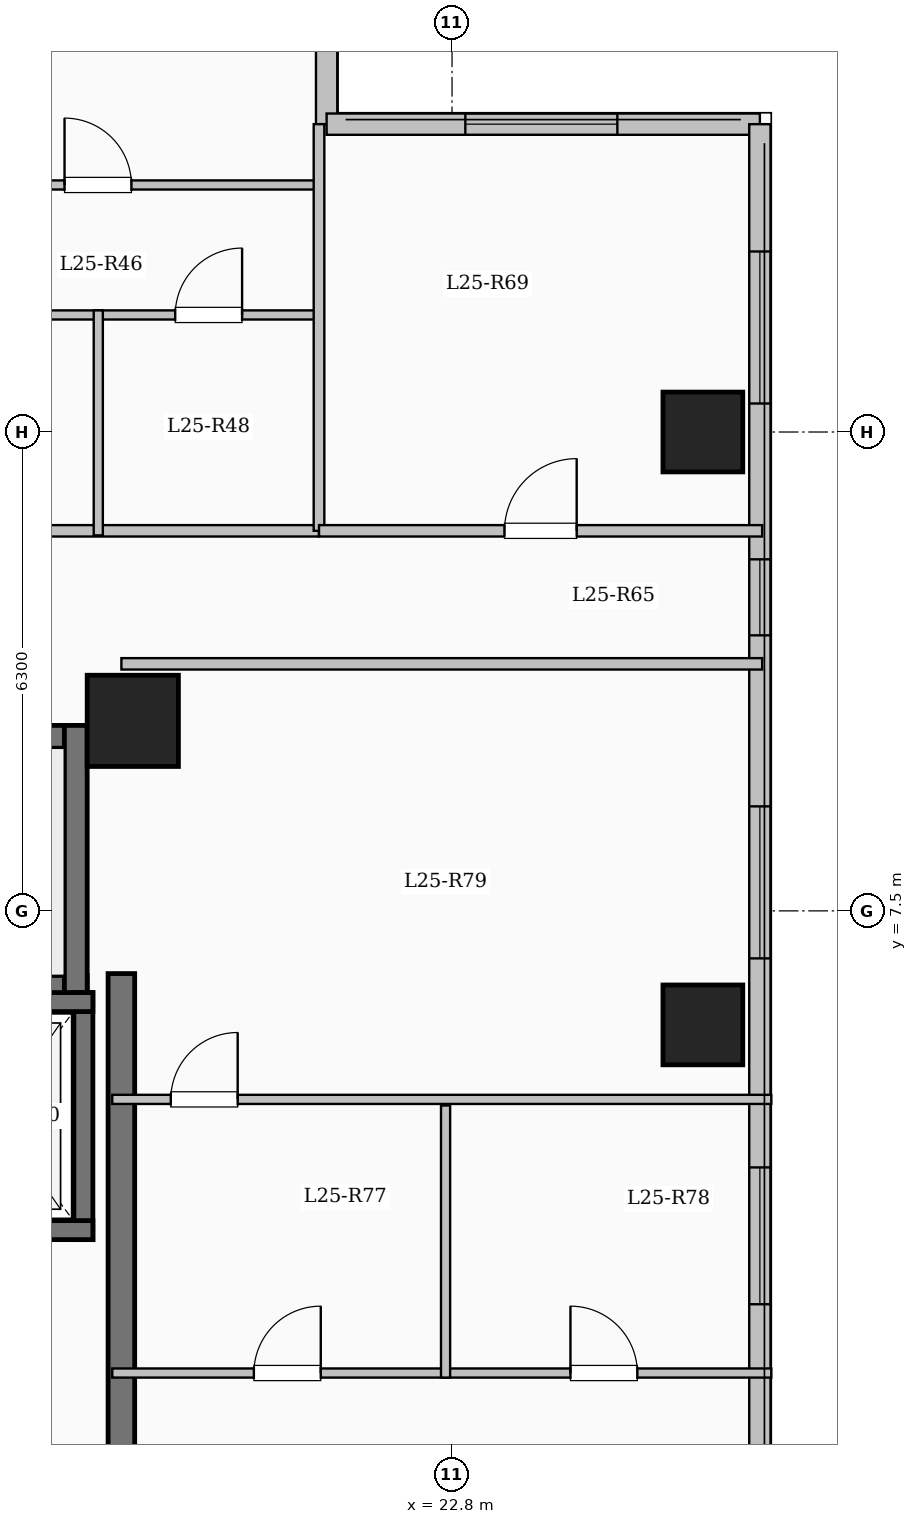
"""IFC4 building model, lengths in metres.
Left out: names, types, materials, properties, quantities, classifications, styles, units other than length and angle.
Written with IfcOpenShell. Run it as: python <this file> out.ifc"""

import sys

from ifc_helpers import new_model, si_unit, direction, frame, frame_2d, origin, origin_2d, place, context, subcontext, project, spatial, rectangle, extrude, element, fill, save


model = new_model("IFC4")
c1 = context("Model", 3, precision=1e-05, world=origin(), true_north=direction((0.0, 1.0)))
c2 = subcontext(c1, "Body", "Model", "MODEL_VIEW")
j1 = project(units=[si_unit("LENGTHUNIT", "METRE"), si_unit("PLANEANGLEUNIT", "RADIAN")], contexts=[c1])
p1 = place(None, origin())
s1 = spatial("IfcSite", under=j1, at=p1, CompositionType="ELEMENT")
p2 = place(p1, origin())
s2 = spatial("IfcBuilding", under=s1, at=p2, CompositionType="ELEMENT")
p3 = place(p2, frame((0.0, 0.0, 95.05)))
s3 = spatial("IfcBuildingStorey", under=s2, at=p3, CompositionType="ELEMENT", Elevation=95.05)
p4 = place(p3, frame((18.6, 10.0, 0.0), z_axis=(0.0, 0.0, 1.0), x_axis=(1.0, 0.0, 0.0)))
e1 = element("IfcColumn", 1, at=p4, inside=s3, PredefinedType="COLUMN", context=c2, shape_type="SweptSolid", body=[
    extrude(rectangle(XDim=1.2, YDim=1.2, at=origin_2d()), origin(), (0.0, 0.0, 1.0), 3.35),
])
for number, where, z_axis, x_axis in (
    (2, (26.1, 6.0, 0.0), (0.0, 0.0, 1.0), (1.0, 0.0, 0.0)),
    (3, (26.1, 13.8, 0.0), (0.0, 0.0, 1.0), (1.0, 0.0, 0.0)),
):
    element("IfcColumn", number, at=place(p3, frame(where, z_axis=z_axis, x_axis=x_axis)), inside=s3, PredefinedType="COLUMN", context=c2, shape_type="SweptSolid", body=[
        extrude(rectangle(XDim=1.05, YDim=1.05, at=origin_2d()), origin(), (0.0, 0.0, 1.0), 3.35),
    ])
p5 = place(p3, frame((21.15, 22.05, 0.0), z_axis=(0.0, 0.0, 1.0), x_axis=(0.0, -1.0, 0.0)))
e4 = element("IfcWall", 4, at=p5, inside=s3, PredefinedType="SOLIDWALL", context=c2, shape_type="SweptSolid", body=[
    extrude(rectangle(XDim=4.2, YDim=0.28, at=frame_2d((2.1, 0.0))), origin(), (0.0, 0.0, 1.0), 3.1),
])
p6 = place(p5, frame((1.218, 0.0, 0.9)))
e5 = element("IfcOpeningElement", 5, at=p6, cuts=e4, PredefinedType="OPENING", context=c2, shape_type="SweptSolid", body=[
    extrude(rectangle(XDim=1.8, YDim=1.65, at=frame_2d((0.9, 0.825))), frame((0.0, 0.15, 0.0), z_axis=(0.0, -1.0, 0.0), x_axis=(1.0, 0.0, 0.0)), (0.0, 0.0, 1.0), 0.3),
])
p7 = place(p3, frame((21.15, 17.85, 0.0), z_axis=(0.0, 0.0, 1.0), x_axis=(1.0, 0.0, 0.0)))
e6 = element("IfcWall", 6, at=p7, inside=s3, PredefinedType="SOLIDWALL", context=c2, shape_type="SweptSolid", body=[
    extrude(rectangle(XDim=5.7, YDim=0.28, at=frame_2d((2.85, 0.0))), origin(), (0.0, 0.0, 1.0), 3.1),
])
p8 = place(p7, frame((1.825, 0.0, 0.9)))
e7 = element("IfcOpeningElement", 7, at=p8, cuts=e6, PredefinedType="OPENING", context=c2, shape_type="SweptSolid", body=[
    extrude(rectangle(XDim=2.0, YDim=1.7, at=frame_2d((1.0, 0.85))), frame((0.0, 0.15, 0.0), z_axis=(0.0, -1.0, 0.0), x_axis=(1.0, 0.0, 0.0)), (0.0, 0.0, 1.0), 0.3),
])
p9 = place(p3, frame((26.85, 17.85, 0.0), z_axis=(0.0, 0.0, 1.0), x_axis=(0.0, -1.0, 0.0)))
e8 = element("IfcWall", 8, at=p9, inside=s3, PredefinedType="SOLIDWALL", context=c2, shape_type="SweptSolid", body=[
    extrude(rectangle(XDim=35.7, YDim=0.28, at=frame_2d((17.85, 0.0))), origin(), (0.0, 0.0, 1.0), 3.1),
])
p10 = place(p9, frame((1.675, 0.0, 0.9)))
e9 = element("IfcOpeningElement", 9, at=p10, cuts=e8, PredefinedType="OPENING", context=c2, shape_type="SweptSolid", body=[
    extrude(rectangle(XDim=2.0, YDim=1.7, at=frame_2d((1.0, 0.85))), frame((0.0, 0.15, 0.0), z_axis=(0.0, -1.0, 0.0), x_axis=(1.0, 0.0, 0.0)), (0.0, 0.0, 1.0), 0.3),
])
p11 = place(p9, frame((5.725, 0.0, 0.95)))
e10 = element("IfcOpeningElement", 10, at=p11, cuts=e8, PredefinedType="OPENING", context=c2, shape_type="SweptSolid", body=[
    extrude(rectangle(XDim=1.0, YDim=1.5, at=frame_2d((0.5, 0.75))), frame((0.0, 0.15, 0.0), z_axis=(0.0, -1.0, 0.0), x_axis=(1.0, 0.0, 0.0)), (0.0, 0.0, 1.0), 0.3),
])
p12 = place(p9, frame((8.975, 0.0, 0.9)))
e11 = element("IfcOpeningElement", 11, at=p12, cuts=e8, PredefinedType="OPENING", context=c2, shape_type="SweptSolid", body=[
    extrude(rectangle(XDim=2.0, YDim=1.7, at=frame_2d((1.0, 0.85))), frame((0.0, 0.15, 0.0), z_axis=(0.0, -1.0, 0.0), x_axis=(1.0, 0.0, 0.0)), (0.0, 0.0, 1.0), 0.3),
])
p13 = place(p9, frame((13.725, 0.0, 0.9)))
e12 = element("IfcOpeningElement", 12, at=p13, cuts=e8, PredefinedType="OPENING", context=c2, shape_type="SweptSolid", body=[
    extrude(rectangle(XDim=1.8, YDim=1.65, at=frame_2d((0.9, 0.825))), frame((0.0, 0.15, 0.0), z_axis=(0.0, -1.0, 0.0), x_axis=(1.0, 0.0, 0.0)), (0.0, 0.0, 1.0), 0.3),
])
p14 = place(p9, frame((19.55, 0.0, 0.9)))
e13 = element("IfcOpeningElement", 13, at=p14, cuts=e8, PredefinedType="OPENING", context=c2, shape_type="SweptSolid", body=[
    extrude(rectangle(XDim=2.4, YDim=1.8, at=frame_2d((1.2, 0.9))), frame((0.0, 0.15, 0.0), z_axis=(0.0, -1.0, 0.0), x_axis=(1.0, 0.0, 0.0)), (0.0, 0.0, 1.0), 0.3),
])
p15 = place(p9, frame((25.857, 0.0, 0.9)))
e14 = element("IfcOpeningElement", 14, at=p15, cuts=e8, PredefinedType="OPENING", context=c2, shape_type="SweptSolid", body=[
    extrude(rectangle(XDim=1.5, YDim=1.65, at=frame_2d((0.75, 0.825))), frame((0.0, 0.15, 0.0), z_axis=(0.0, -1.0, 0.0), x_axis=(1.0, 0.0, 0.0)), (0.0, 0.0, 1.0), 0.3),
])
p16 = place(p9, frame((30.75, 0.0, 0.9)))
e15 = element("IfcOpeningElement", 15, at=p16, cuts=e8, PredefinedType="OPENING", context=c2, shape_type="SweptSolid", body=[
    extrude(rectangle(XDim=2.4, YDim=1.8, at=frame_2d((1.2, 0.9))), frame((0.0, 0.15, 0.0), z_axis=(0.0, -1.0, 0.0), x_axis=(1.0, 0.0, 0.0)), (0.0, 0.0, 1.0), 0.3),
])
p17 = place(p3, frame((10.0, 9.79, 0.0), z_axis=(0.0, 0.0, 1.0), x_axis=(1.0, 0.0, 0.0)))
e16 = element("IfcWall", 16, at=p17, inside=s3, PredefinedType="SHEAR", context=c2, shape_type="SweptSolid", body=[
    extrude(rectangle(XDim=8.0, YDim=0.3, at=frame_2d((4.0, 0.0))), origin(), (0.0, 0.0, 1.0), 3.35),
])
p18 = place(p3, frame((10.0, 6.5, 0.0), z_axis=(0.0, 0.0, 1.0), x_axis=(1.0, 0.0, 0.0)))
e17 = element("IfcWall", 17, at=p18, inside=s3, PredefinedType="SHEAR", context=c2, shape_type="SweptSolid", body=[
    extrude(rectangle(XDim=8.0, YDim=0.3, at=frame_2d((4.0, 0.0))), origin(), (0.0, 0.0, 1.0), 3.35),
])
p19 = place(p18, frame((0.55, 0.0, 0.0)))
e18 = element("IfcOpeningElement", 18, at=p19, cuts=e17, PredefinedType="OPENING", context=c2, shape_type="SweptSolid", body=[
    extrude(rectangle(XDim=1.0, YDim=2.15, at=frame_2d((0.5, 1.075))), frame((0.0, 0.16, 0.0), z_axis=(0.0, -1.0, 0.0), x_axis=(1.0, 0.0, 0.0)), (0.0, 0.0, 1.0), 0.32),
])
p20 = place(p3, frame((17.85, 6.35, 0.0), z_axis=(0.0, 0.0, 1.0), x_axis=(0.0, 1.0, 0.0)))
e19 = element("IfcWall", 19, at=p20, inside=s3, PredefinedType="SHEAR", context=c2, shape_type="SweptSolid", body=[
    extrude(rectangle(XDim=3.59, YDim=0.3, at=frame_2d((1.795, 0.0))), origin(), (0.0, 0.0, 1.0), 3.35),
])
p21 = place(p3, frame((17.95, 3.175, 0.0), z_axis=(0.0, 0.0, 1.0), x_axis=(0.0, 1.0, 0.0)))
e20 = element("IfcWall", 20, at=p21, inside=s3, PredefinedType="SHEAR", context=c2, shape_type="SweptSolid", body=[
    extrude(rectangle(XDim=3.25, YDim=0.25, at=frame_2d((1.625, 0.0))), origin(), (0.0, 0.0, 1.0), 3.35),
])
for number, where, z_axis, x_axis in (
    (21, (15.525, 3.3, 0.0), (0.0, 0.0, 1.0), (1.0, 0.0, 0.0)),
    (22, (15.525, 6.3, 0.0), (0.0, 0.0, 1.0), (1.0, 0.0, 0.0)),
):
    element("IfcWall", number, at=place(p3, frame(where, z_axis=z_axis, x_axis=x_axis)), inside=s3, PredefinedType="SHEAR", context=c2, shape_type="SweptSolid", body=[
        extrude(rectangle(XDim=2.55, YDim=0.25, at=frame_2d((1.275, 0.0))), origin(), (0.0, 0.0, 1.0), 3.35),
    ])
p22 = place(p3, frame((18.45, -7.375, 0.0), z_axis=(0.0, 0.0, 1.0), x_axis=(0.0, 1.0, 0.0)))
e23 = element("IfcWall", 23, at=p22, inside=s3, PredefinedType="SHEAR", context=c2, shape_type="SweptSolid", body=[
    extrude(rectangle(XDim=14.05, YDim=0.35, at=frame_2d((7.025, 0.0))), origin(), (0.0, 0.0, 1.0), 3.35),
])
p23 = place(p3, frame((3.85, 12.5, 0.0), z_axis=(0.0, 0.0, 1.0), x_axis=(1.0, 0.0, 0.0)))
e24 = element("IfcWall", 24, at=p23, inside=s3, PredefinedType="PARTITIONING", context=c2, shape_type="SweptSolid", body=[
    extrude(rectangle(XDim=17.2, YDim=0.15, at=frame_2d((8.6, 0.0))), origin(), (0.0, 0.0, 1.0), 3.1),
])
p24 = place(p23, frame((1.6, 0.0, 0.0)))
e25 = element("IfcOpeningElement", 25, at=p24, cuts=e24, PredefinedType="OPENING", context=c2, shape_type="SweptSolid", body=[
    extrude(rectangle(XDim=0.96, YDim=2.15, at=frame_2d((0.48, 1.075))), frame((0.0, 0.085, 0.0), z_axis=(0.0, -1.0, 0.0), x_axis=(1.0, 0.0, 0.0)), (0.0, 0.0, 1.0), 0.17),
])
p25 = place(p23, frame((6.625, 0.0, 0.0)))
e26 = element("IfcOpeningElement", 26, at=p25, cuts=e24, PredefinedType="OPENING", context=c2, shape_type="SweptSolid", body=[
    extrude(rectangle(XDim=0.96, YDim=2.15, at=frame_2d((0.48, 1.075))), frame((0.0, 0.085, 0.0), z_axis=(0.0, -1.0, 0.0), x_axis=(1.0, 0.0, 0.0)), (0.0, 0.0, 1.0), 0.17),
])
p26 = place(p3, frame((15.413, 15.34, 0.0), z_axis=(0.0, 0.0, 1.0), x_axis=(1.0, 0.0, 0.0)))
e27 = element("IfcWall", 27, at=p26, inside=s3, PredefinedType="PARTITIONING", context=c2, shape_type="SweptSolid", body=[
    extrude(rectangle(XDim=2.733, YDim=0.12, at=frame_2d((1.366, 0.0))), origin(), (0.0, 0.0, 1.0), 3.1),
])
p27 = place(p26, frame((0.927, 0.0, 0.0)))
e28 = element("IfcOpeningElement", 28, at=p27, cuts=e27, PredefinedType="OPENING", context=c2, shape_type="SweptSolid", body=[
    extrude(rectangle(XDim=0.88, YDim=2.1, at=frame_2d((0.44, 1.05))), frame((0.0, 0.07, 0.0), z_axis=(0.0, -1.0, 0.0), x_axis=(1.0, 0.0, 0.0)), (0.0, 0.0, 1.0), 0.14),
])
p28 = place(p3, frame((18.146, 15.34, 0.0), z_axis=(0.0, 0.0, 1.0), x_axis=(1.0, 0.0, 0.0)))
e29 = element("IfcWall", 29, at=p28, inside=s3, PredefinedType="PARTITIONING", context=c2, shape_type="SweptSolid", body=[
    extrude(rectangle(XDim=2.904, YDim=0.12, at=frame_2d((1.452, 0.0))), origin(), (0.0, 0.0, 1.0), 3.1),
])
p29 = place(p28, frame((1.012, 0.0, 0.0)))
e30 = element("IfcOpeningElement", 30, at=p29, cuts=e29, PredefinedType="OPENING", context=c2, shape_type="SweptSolid", body=[
    extrude(rectangle(XDim=0.88, YDim=2.1, at=frame_2d((0.44, 1.05))), frame((0.0, 0.07, 0.0), z_axis=(0.0, -1.0, 0.0), x_axis=(1.0, 0.0, 0.0)), (0.0, 0.0, 1.0), 0.14),
])
p30 = place(p3, frame((15.353, 17.05, 0.0), z_axis=(0.0, 0.0, 1.0), x_axis=(1.0, 0.0, 0.0)))
e31 = element("IfcWall", 31, at=p30, inside=s3, PredefinedType="PARTITIONING", context=c2, shape_type="SweptSolid", body=[
    extrude(rectangle(XDim=5.757, YDim=0.12, at=frame_2d((2.878, 0.0))), origin(), (0.0, 0.0, 1.0), 3.1),
])
p31 = place(p30, frame((2.349, 0.0, 0.0)))
e32 = element("IfcOpeningElement", 32, at=p31, cuts=e31, PredefinedType="OPENING", context=c2, shape_type="SweptSolid", body=[
    extrude(rectangle(XDim=0.88, YDim=2.1, at=frame_2d((0.44, 1.05))), frame((0.0, 0.07, 0.0), z_axis=(0.0, -1.0, 0.0), x_axis=(1.0, 0.0, 0.0)), (0.0, 0.0, 1.0), 0.14),
])
p32 = place(p3, frame((18.146, 12.44, 0.0), z_axis=(0.0, 0.0, 1.0), x_axis=(0.0, 1.0, 0.0)))
e33 = element("IfcWall", 33, at=p32, inside=s3, PredefinedType="PARTITIONING", context=c2, shape_type="SweptSolid", body=[
    extrude(rectangle(XDim=2.96, YDim=0.12, at=frame_2d((1.48, 0.0))), origin(), (0.0, 0.0, 1.0), 3.1),
])
p33 = place(p3, frame((18.45, 10.75, 0.0), z_axis=(0.0, 0.0, 1.0), x_axis=(1.0, 0.0, 0.0)))
e34 = element("IfcWall", 34, at=p33, inside=s3, PredefinedType="PARTITIONING", context=c2, shape_type="SweptSolid", body=[
    extrude(rectangle(XDim=8.43, YDim=0.15, at=frame_2d((4.215, 0.0))), origin(), (0.0, 0.0, 1.0), 3.1),
])
p34 = place(p3, frame((21.05, 12.5, 0.0), z_axis=(0.0, 0.0, 1.0), x_axis=(0.0, 1.0, 0.0)))
e35 = element("IfcWall", 35, at=p34, inside=s3, PredefinedType="PARTITIONING", context=c2, shape_type="SweptSolid", body=[
    extrude(rectangle(XDim=5.35, YDim=0.14, at=frame_2d((2.675, 0.0))), origin(), (0.0, 0.0, 1.0), 3.1),
])
p35 = place(p3, frame((21.05, 12.5, 0.0), z_axis=(0.0, 0.0, 1.0), x_axis=(1.0, 0.0, 0.0)))
e36 = element("IfcWall", 36, at=p35, inside=s3, PredefinedType="PARTITIONING", context=c2, shape_type="SweptSolid", body=[
    extrude(rectangle(XDim=5.83, YDim=0.15, at=frame_2d((2.915, 0.0))), origin(), (0.0, 0.0, 1.0), 3.1),
])
p36 = place(p35, frame((2.44, 0.0, 0.0)))
e37 = element("IfcOpeningElement", 37, at=p36, cuts=e36, PredefinedType="OPENING", context=c2, shape_type="SweptSolid", body=[
    extrude(rectangle(XDim=0.95, YDim=2.15, at=frame_2d((0.475, 1.075))), frame((0.0, 0.085, 0.0), z_axis=(0.0, -1.0, 0.0), x_axis=(1.0, 0.0, 0.0)), (0.0, 0.0, 1.0), 0.17),
])
p37 = place(p3, frame((18.33, 1.42, 0.0), z_axis=(0.0, 0.0, 1.0), x_axis=(1.0, 0.0, 0.0)))
e38 = element("IfcWall", 38, at=p37, inside=s3, PredefinedType="PARTITIONING", context=c2, shape_type="SweptSolid", body=[
    extrude(rectangle(XDim=8.67, YDim=0.12, at=frame_2d((4.335, 0.0))), origin(), (0.0, 0.0, 1.0), 3.1),
])
p38 = place(p37, frame((1.863, 0.0, 0.0)))
e39 = element("IfcOpeningElement", 39, at=p38, cuts=e38, PredefinedType="OPENING", context=c2, shape_type="SweptSolid", body=[
    extrude(rectangle(XDim=0.88, YDim=2.1, at=frame_2d((0.44, 1.05))), frame((0.0, 0.07, 0.0), z_axis=(0.0, -1.0, 0.0), x_axis=(1.0, 0.0, 0.0)), (0.0, 0.0, 1.0), 0.14),
])
p39 = place(p37, frame((6.028, 0.0, 0.0)))
e40 = element("IfcOpeningElement", 40, at=p39, cuts=e38, PredefinedType="OPENING", context=c2, shape_type="SweptSolid", body=[
    extrude(rectangle(XDim=0.88, YDim=2.1, at=frame_2d((0.44, 1.05))), frame((0.0, 0.07, 0.0), z_axis=(0.0, -1.0, 0.0), x_axis=(1.0, 0.0, 0.0)), (0.0, 0.0, 1.0), 0.14),
])
p40 = place(p3, frame((18.33, 5.02, 0.0), z_axis=(0.0, 0.0, 1.0), x_axis=(1.0, 0.0, 0.0)))
e41 = element("IfcWall", 41, at=p40, inside=s3, PredefinedType="PARTITIONING", context=c2, shape_type="SweptSolid", body=[
    extrude(rectangle(XDim=8.67, YDim=0.12, at=frame_2d((4.335, 0.0))), origin(), (0.0, 0.0, 1.0), 3.1),
])
p41 = place(p40, frame((0.77, 0.0, 0.0)))
e42 = element("IfcOpeningElement", 42, at=p41, cuts=e41, PredefinedType="OPENING", context=c2, shape_type="SweptSolid", body=[
    extrude(rectangle(XDim=0.88, YDim=2.1, at=frame_2d((0.44, 1.05))), frame((0.0, 0.07, 0.0), z_axis=(0.0, -1.0, 0.0), x_axis=(1.0, 0.0, 0.0)), (0.0, 0.0, 1.0), 0.14),
])
p42 = place(p3, frame((22.715, 1.36, 0.0), z_axis=(0.0, 0.0, 1.0), x_axis=(0.0, 1.0, 0.0)))
e43 = element("IfcWall", 43, at=p42, inside=s3, PredefinedType="PARTITIONING", context=c2, shape_type="SweptSolid", body=[
    extrude(rectangle(XDim=3.58, YDim=0.12, at=frame_2d((1.79, 0.0))), origin(), (0.0, 0.0, 1.0), 3.1),
])
p43 = place(p8, origin())
e44 = element("IfcWindow", 44, at=p43, inside=s3, PartitioningType="SINGLE_PANEL", PredefinedType="WINDOW", context=c2, shape_type="SweptSolid", body=[
    extrude(rectangle(XDim=2.0, YDim=1.7, at=frame_2d((1.0, 0.85))), frame((0.0, 0.03, 0.0), z_axis=(0.0, -1.0, 0.0), x_axis=(1.0, 0.0, 0.0)), (0.0, 0.0, 1.0), 0.06),
])
fill(e7, e44)
p44 = place(p10, origin())
e45 = element("IfcWindow", 45, at=p44, inside=s3, PartitioningType="SINGLE_PANEL", PredefinedType="WINDOW", context=c2, shape_type="SweptSolid", body=[
    extrude(rectangle(XDim=2.0, YDim=1.7, at=frame_2d((1.0, 0.85))), frame((0.0, 0.03, 0.0), z_axis=(0.0, -1.0, 0.0), x_axis=(1.0, 0.0, 0.0)), (0.0, 0.0, 1.0), 0.06),
])
fill(e9, e45)
p45 = place(p11, origin())
e46 = element("IfcWindow", 46, at=p45, inside=s3, PartitioningType="SINGLE_PANEL", PredefinedType="WINDOW", context=c2, shape_type="SweptSolid", body=[
    extrude(rectangle(XDim=1.0, YDim=1.5, at=frame_2d((0.5, 0.75))), frame((0.0, 0.03, 0.0), z_axis=(0.0, -1.0, 0.0), x_axis=(1.0, 0.0, 0.0)), (0.0, 0.0, 1.0), 0.06),
])
fill(e10, e46)
p46 = place(p12, origin())
e47 = element("IfcWindow", 47, at=p46, inside=s3, PartitioningType="SINGLE_PANEL", PredefinedType="WINDOW", context=c2, shape_type="SweptSolid", body=[
    extrude(rectangle(XDim=2.0, YDim=1.7, at=frame_2d((1.0, 0.85))), frame((0.0, 0.03, 0.0), z_axis=(0.0, -1.0, 0.0), x_axis=(1.0, 0.0, 0.0)), (0.0, 0.0, 1.0), 0.06),
])
fill(e11, e47)
p47 = place(p13, origin())
e48 = element("IfcWindow", 48, at=p47, inside=s3, PartitioningType="SINGLE_PANEL", PredefinedType="WINDOW", context=c2, shape_type="SweptSolid", body=[
    extrude(rectangle(XDim=1.8, YDim=1.65, at=frame_2d((0.9, 0.825))), frame((0.0, 0.03, 0.0), z_axis=(0.0, -1.0, 0.0), x_axis=(1.0, 0.0, 0.0)), (0.0, 0.0, 1.0), 0.06),
])
fill(e12, e48)
p48 = place(p29, origin())
e49 = element("IfcDoor", 49, at=p48, inside=s3, OperationType="SINGLE_SWING_RIGHT", PredefinedType="DOOR", context=c2, shape_type="SweptSolid", body=[
    extrude(rectangle(XDim=0.88, YDim=2.1, at=frame_2d((0.44, 1.05))), frame((0.0, 0.025, 0.0), z_axis=(0.0, -1.0, 0.0), x_axis=(1.0, 0.0, 0.0)), (0.0, 0.0, 1.0), 0.05),
])
fill(e30, e49)
p49 = place(p31, origin())
e50 = element("IfcDoor", 50, at=p49, inside=s3, OperationType="SINGLE_SWING_LEFT", PredefinedType="DOOR", context=c2, shape_type="SweptSolid", body=[
    extrude(rectangle(XDim=0.88, YDim=2.1, at=frame_2d((0.44, 1.05))), frame((0.0, 0.025, 0.0), z_axis=(0.0, -1.0, 0.0), x_axis=(1.0, 0.0, 0.0)), (0.0, 0.0, 1.0), 0.05),
])
fill(e32, e50)
p50 = place(p36, origin())
e51 = element("IfcDoor", 51, at=p50, inside=s3, OperationType="SINGLE_SWING_RIGHT", PredefinedType="DOOR", context=c2, shape_type="SweptSolid", body=[
    extrude(rectangle(XDim=0.95, YDim=2.15, at=frame_2d((0.475, 1.075))), frame((0.0, 0.025, 0.0), z_axis=(0.0, -1.0, 0.0), x_axis=(1.0, 0.0, 0.0)), (0.0, 0.0, 1.0), 0.05),
])
fill(e37, e51)
p51 = place(p38, origin())
e52 = element("IfcDoor", 52, at=p51, inside=s3, OperationType="SINGLE_SWING_RIGHT", PredefinedType="DOOR", context=c2, shape_type="SweptSolid", body=[
    extrude(rectangle(XDim=0.88, YDim=2.1, at=frame_2d((0.44, 1.05))), frame((0.0, 0.025, 0.0), z_axis=(0.0, -1.0, 0.0), x_axis=(1.0, 0.0, 0.0)), (0.0, 0.0, 1.0), 0.05),
])
fill(e39, e52)
p52 = place(p39, origin())
e53 = element("IfcDoor", 53, at=p52, inside=s3, OperationType="SINGLE_SWING_LEFT", PredefinedType="DOOR", context=c2, shape_type="SweptSolid", body=[
    extrude(rectangle(XDim=0.88, YDim=2.1, at=frame_2d((0.44, 1.05))), frame((0.0, 0.025, 0.0), z_axis=(0.0, -1.0, 0.0), x_axis=(1.0, 0.0, 0.0)), (0.0, 0.0, 1.0), 0.05),
])
fill(e40, e53)
p53 = place(p41, origin())
e54 = element("IfcDoor", 54, at=p53, inside=s3, OperationType="SINGLE_SWING_RIGHT", PredefinedType="DOOR", context=c2, shape_type="SweptSolid", body=[
    extrude(rectangle(XDim=0.88, YDim=2.1, at=frame_2d((0.44, 1.05))), frame((0.0, 0.025, 0.0), z_axis=(0.0, -1.0, 0.0), x_axis=(1.0, 0.0, 0.0)), (0.0, 0.0, 1.0), 0.05),
])
fill(e42, e54)
save(model, sys.argv[1])
